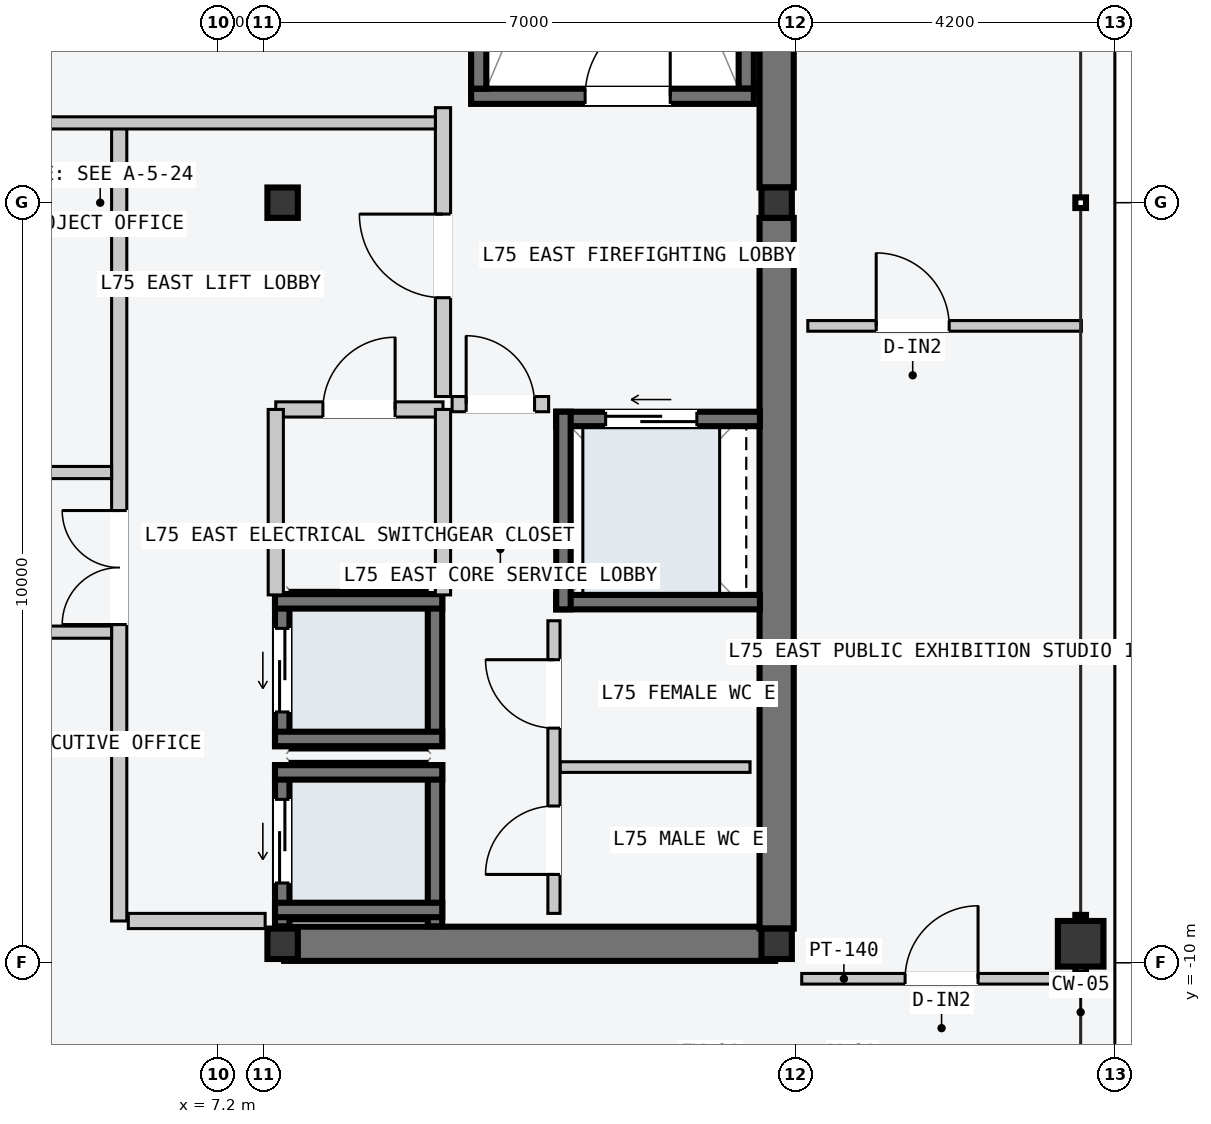
"""IFC4 building model, lengths in metres.
Left out: names, types, materials, properties, quantities, classifications, styles, units other than length and angle.
Written with IfcOpenShell. Run it as: python <this file> out.ifc"""

import sys

from ifc_helpers import new_model, si_unit, direction, frame, frame_2d, origin, origin_2d, place, context, subcontext, project, spatial, rectangle, hollow_rectangle, i_section, extrude, element, fill, save


model = new_model("IFC4")
c1 = context("Model", 3, precision=1e-05, world=origin(), true_north=direction((0.0, 1.0)))
c2 = subcontext(c1, "Body", "Model", "MODEL_VIEW")
j1 = project(units=[si_unit("LENGTHUNIT", "METRE"), si_unit("PLANEANGLEUNIT", "RADIAN")], contexts=[c1])
p1 = place(None, origin())
s1 = spatial("IfcSite", under=j1, at=p1, CompositionType="ELEMENT")
p2 = place(p1, origin())
s2 = spatial("IfcBuilding", under=s1, at=p2, CompositionType="ELEMENT")
p3 = place(p2, frame((0.0, 0.0, 284.4)))
s3 = spatial("IfcBuildingStorey", under=s2, at=p3, CompositionType="ELEMENT", Elevation=284.4)
p4 = place(p3, frame((8.07, -9.75, -0.2), z_axis=(0.0, 0.0, 1.0), x_axis=(1.0, 0.0, 0.0)))
e1 = element("IfcWall", 1, at=p4, inside=s3, PredefinedType="SHEAR", context=c2, shape_type="SweptSolid", body=[
    extrude(rectangle(XDim=6.46, YDim=0.45, at=frame_2d((3.23, 0.0))), origin(), (0.0, 0.0, 1.0), 4.8),
])
for number, where, z_axis, x_axis in (
    (2, (14.55, -9.55, -0.2), (0.0, 0.0, 1.0), (0.0, 1.0, 0.0)),
    (3, (14.55, 0.2, -0.2), (0.0, 0.0, 1.0), (0.0, 1.0, 0.0)),
):
    element("IfcWall", number, at=place(p3, frame(where, z_axis=z_axis, x_axis=x_axis)), inside=s3, PredefinedType="SHEAR", context=c2, shape_type="SweptSolid", body=[
        extrude(rectangle(XDim=9.35, YDim=0.45, at=frame_2d((4.675, 0.0))), origin(), (0.0, 0.0, 1.0), 4.8),
    ])
p5 = place(p3, frame((14.15, 1.5, -0.2), z_axis=(0.0, 0.0, 1.0), x_axis=(0.0, 1.0, 0.0)))
e4 = element("IfcWall", 4, at=p5, inside=s3, PredefinedType="SOLIDWALL", context=c2, shape_type="SweptSolid", body=[
    extrude(rectangle(XDim=7.8, YDim=0.2, at=frame_2d((3.9, 0.0))), origin(), (0.0, 0.0, 1.0), 4.8),
])
p6 = place(p3, frame((10.53, 1.4, -0.2), z_axis=(0.0, 0.0, 1.0), x_axis=(1.0, 0.0, 0.0)))
e5 = element("IfcWall", 5, at=p6, inside=s3, PredefinedType="SOLIDWALL", context=c2, shape_type="SweptSolid", body=[
    extrude(rectangle(XDim=3.72, YDim=0.2, at=frame_2d((1.86, 0.0))), origin(), (0.0, 0.0, 1.0), 4.8),
])
p7 = place(p6, frame((1.5, 0.0, 0.2)))
e6 = element("IfcOpeningElement", 6, at=p7, cuts=e5, PredefinedType="OPENING", context=c2, shape_type="SweptSolid", body=[
    extrude(rectangle(XDim=1.12, YDim=2.18, at=frame_2d((0.56, 1.09))), frame((0.0, 0.11, 0.0), z_axis=(0.0, -1.0, 0.0), x_axis=(1.0, 0.0, 0.0)), (0.0, 0.0, 1.0), 0.22),
])
p8 = place(p3, frame((10.63, 1.5, -0.2), z_axis=(0.0, 0.0, 1.0), x_axis=(0.0, 1.0, 0.0)))
e7 = element("IfcWall", 7, at=p8, inside=s3, PredefinedType="SOLIDWALL", context=c2, shape_type="SweptSolid", body=[
    extrude(rectangle(XDim=7.8, YDim=0.2, at=frame_2d((3.9, 0.0))), origin(), (0.0, 0.0, 1.0), 4.8),
])
for number, where, z_axis, x_axis in (
    (8, (8.05, -9.75, 0.0), (0.0, 0.0, 1.0), (1.0, 0.0, 0.0)),
    (9, (8.05, 0.0, 0.0), (0.0, 0.0, 1.0), (1.0, 0.0, 0.0)),
    (10, (14.55, -9.75, 0.0), (0.0, 0.0, 1.0), (1.0, 0.0, 0.0)),
    (11, (14.55, 0.0, 0.0), (0.0, 0.0, 1.0), (1.0, 0.0, 0.0)),
):
    element("IfcColumn", number, at=place(p3, frame(where, z_axis=z_axis, x_axis=x_axis)), inside=s3, PredefinedType="COLUMN", context=c2, shape_type="SweptSolid", body=[
        extrude(i_section(OverallWidth=0.4, OverallDepth=0.4, WebThickness=0.013, FlangeThickness=0.021, at=origin_2d()), origin(), (0.0, 0.0, 1.0), 4.8),
    ])
p9 = place(p3, frame((18.55, -9.75, 0.0), z_axis=(0.0, 0.0, 1.0), x_axis=(0.0, 1.0, 0.0)))
e12 = element("IfcColumn", 12, at=p9, inside=s3, PredefinedType="COLUMN", context=c2, shape_type="SweptSolid", body=[
    extrude(hollow_rectangle(XDim=0.6, YDim=0.6, WallThickness=0.025, at=origin_2d()), origin(), (0.0, 0.0, 1.0), 4.8),
])
p10 = place(p3, frame((8.045, -9.52, -0.2), z_axis=(0.0, 0.0, 1.0), x_axis=(0.0, 1.0, 0.0)))
e13 = element("IfcWall", 13, at=p10, inside=s3, PredefinedType="SOLIDWALL", context=c2, shape_type="SweptSolid", body=[
    extrude(rectangle(XDim=2.12, YDim=0.19, at=frame_2d((1.06, 0.0))), origin(), (0.0, 0.0, 1.0), 4.8),
])
p11 = place(p10, frame((0.57, 0.0, 0.2)))
e14 = element("IfcOpeningElement", 14, at=p11, cuts=e13, PredefinedType="OPENING", context=c2, shape_type="SweptSolid", body=[
    extrude(rectangle(XDim=1.1, YDim=2.2, at=frame_2d((0.55, 1.1))), frame((0.0, 0.105, 0.0), z_axis=(0.0, -1.0, 0.0), x_axis=(1.0, 0.0, 0.0)), (0.0, 0.0, 1.0), 0.21),
])
p12 = place(p3, frame((10.055, -9.52, -0.2), z_axis=(0.0, 0.0, 1.0), x_axis=(0.0, 1.0, 0.0)))
e15 = element("IfcWall", 15, at=p12, inside=s3, PredefinedType="SOLIDWALL", context=c2, shape_type="SweptSolid", body=[
    extrude(rectangle(XDim=2.12, YDim=0.19, at=frame_2d((1.06, 0.0))), origin(), (0.0, 0.0, 1.0), 4.8),
])
for number, where, z_axis, x_axis in (
    (16, (7.95, -7.495, -0.2), (0.0, 0.0, 1.0), (1.0, 0.0, 0.0)),
    (17, (7.95, -9.305, -0.2), (0.0, 0.0, 1.0), (1.0, 0.0, 0.0)),
):
    element("IfcWall", number, at=place(p3, frame(where, z_axis=z_axis, x_axis=x_axis)), inside=s3, PredefinedType="SOLIDWALL", context=c2, shape_type="SweptSolid", body=[
        extrude(rectangle(XDim=2.2, YDim=0.19, at=frame_2d((1.1, 0.0))), origin(), (0.0, 0.0, 1.0), 4.8),
    ])
p13 = place(p3, frame((8.045, -7.15, -0.2), z_axis=(0.0, 0.0, 1.0), x_axis=(0.0, 1.0, 0.0)))
e18 = element("IfcWall", 18, at=p13, inside=s3, PredefinedType="SOLIDWALL", context=c2, shape_type="SweptSolid", body=[
    extrude(rectangle(XDim=2.0, YDim=0.19, at=frame_2d((1.0, 0.0))), origin(), (0.0, 0.0, 1.0), 4.8),
])
p14 = place(p13, frame((0.45, 0.0, 0.2)))
e19 = element("IfcOpeningElement", 19, at=p14, cuts=e18, PredefinedType="OPENING", context=c2, shape_type="SweptSolid", body=[
    extrude(rectangle(XDim=1.1, YDim=2.2, at=frame_2d((0.55, 1.1))), frame((0.0, 0.105, 0.0), z_axis=(0.0, -1.0, 0.0), x_axis=(1.0, 0.0, 0.0)), (0.0, 0.0, 1.0), 0.21),
])
p15 = place(p3, frame((10.055, -7.15, -0.2), z_axis=(0.0, 0.0, 1.0), x_axis=(0.0, 1.0, 0.0)))
e20 = element("IfcWall", 20, at=p15, inside=s3, PredefinedType="SOLIDWALL", context=c2, shape_type="SweptSolid", body=[
    extrude(rectangle(XDim=2.0, YDim=0.19, at=frame_2d((1.0, 0.0))), origin(), (0.0, 0.0, 1.0), 4.8),
])
for number, where, z_axis, x_axis in (
    (21, (7.95, -5.245, -0.2), (0.0, 0.0, 1.0), (1.0, 0.0, 0.0)),
    (22, (7.95, -7.055, -0.2), (0.0, 0.0, 1.0), (1.0, 0.0, 0.0)),
):
    element("IfcWall", number, at=place(p3, frame(where, z_axis=z_axis, x_axis=x_axis)), inside=s3, PredefinedType="SOLIDWALL", context=c2, shape_type="SweptSolid", body=[
        extrude(rectangle(XDim=2.2, YDim=0.19, at=frame_2d((1.1, 0.0))), origin(), (0.0, 0.0, 1.0), 4.8),
    ])
p16 = place(p3, frame((11.65, -2.845, -0.2), z_axis=(0.0, 0.0, 1.0), x_axis=(1.0, 0.0, 0.0)))
e23 = element("IfcWall", 23, at=p16, inside=s3, PredefinedType="SOLIDWALL", context=c2, shape_type="SweptSolid", body=[
    extrude(rectangle(XDim=2.68, YDim=0.19, at=frame_2d((1.34, 0.0))), origin(), (0.0, 0.0, 1.0), 4.8),
])
p17 = place(p16, frame((0.65, 0.0, 0.2)))
e24 = element("IfcOpeningElement", 24, at=p17, cuts=e23, PredefinedType="OPENING", context=c2, shape_type="SweptSolid", body=[
    extrude(rectangle(XDim=1.2, YDim=2.2, at=frame_2d((0.6, 1.1))), frame((0.0, 0.105, 0.0), z_axis=(0.0, -1.0, 0.0), x_axis=(1.0, 0.0, 0.0)), (0.0, 0.0, 1.0), 0.21),
])
p18 = place(p3, frame((11.65, -5.255, -0.2), z_axis=(0.0, 0.0, 1.0), x_axis=(1.0, 0.0, 0.0)))
e25 = element("IfcWall", 25, at=p18, inside=s3, PredefinedType="SOLIDWALL", context=c2, shape_type="SweptSolid", body=[
    extrude(rectangle(XDim=2.68, YDim=0.19, at=frame_2d((1.34, 0.0))), origin(), (0.0, 0.0, 1.0), 4.8),
])
p19 = place(p3, frame((11.745, -5.35, -0.2), z_axis=(0.0, 0.0, 1.0), x_axis=(0.0, 1.0, 0.0)))
e26 = element("IfcWall", 26, at=p19, inside=s3, PredefinedType="SOLIDWALL", context=c2, shape_type="SweptSolid", body=[
    extrude(rectangle(XDim=2.6, YDim=0.19, at=frame_2d((1.3, 0.0))), origin(), (0.0, 0.0, 1.0), 4.8),
])
p20 = place(p3, frame((5.9, -9.45, 0.0), z_axis=(0.0, 0.0, 1.0), x_axis=(0.0, 1.0, 0.0)))
e27 = element("IfcWall", 27, at=p20, inside=s3, PredefinedType="PARTITIONING", context=c2, shape_type="SweptSolid", body=[
    extrude(rectangle(XDim=10.5, YDim=0.2, at=frame_2d((5.25, 0.0))), origin(), (0.0, 0.0, 1.0), 4.6),
])
p21 = place(p20, frame((3.9, 0.0, 0.0)))
e28 = element("IfcOpeningElement", 28, at=p21, cuts=e27, PredefinedType="OPENING", context=c2, shape_type="SweptSolid", body=[
    extrude(rectangle(XDim=1.5, YDim=2.2, at=frame_2d((0.75, 1.1))), frame((0.0, 0.11, 0.0), z_axis=(0.0, -1.0, 0.0), x_axis=(1.0, 0.0, 0.0)), (0.0, 0.0, 1.0), 0.22),
])
p22 = place(p3, frame((6.02, -9.45, 0.0), z_axis=(0.0, 0.0, 1.0), x_axis=(1.0, 0.0, 0.0)))
e29 = element("IfcWall", 29, at=p22, inside=s3, PredefinedType="PARTITIONING", context=c2, shape_type="SweptSolid", body=[
    extrude(rectangle(XDim=1.8, YDim=0.2, at=frame_2d((0.9, 0.0))), origin(), (0.0, 0.0, 1.0), 4.6),
])
p23 = place(p3, frame((10.16, -2.55, 0.0), z_axis=(0.0, 0.0, 1.0), x_axis=(0.0, 1.0, 0.0)))
e30 = element("IfcWall", 30, at=p23, inside=s3, PredefinedType="PARTITIONING", context=c2, shape_type="SweptSolid", body=[
    extrude(rectangle(XDim=3.8, YDim=0.2, at=frame_2d((1.9, 0.0))), origin(), (0.0, 0.0, 1.0), 4.6),
])
p24 = place(p23, frame((1.3, 0.0, 0.0)))
e31 = element("IfcOpeningElement", 31, at=p24, cuts=e30, PredefinedType="OPENING", context=c2, shape_type="SweptSolid", body=[
    extrude(rectangle(XDim=1.1, YDim=2.15, at=frame_2d((0.55, 1.075))), frame((0.0, 0.11, 0.0), z_axis=(0.0, -1.0, 0.0), x_axis=(1.0, 0.0, 0.0)), (0.0, 0.0, 1.0), 0.22),
])
p25 = place(p3, frame((10.28, -2.65, 0.0), z_axis=(0.0, 0.0, 1.0), x_axis=(1.0, 0.0, 0.0)))
e32 = element("IfcWall", 32, at=p25, inside=s3, PredefinedType="PARTITIONING", context=c2, shape_type="SweptSolid", body=[
    extrude(rectangle(XDim=1.27, YDim=0.2, at=frame_2d((0.635, 0.0))), origin(), (0.0, 0.0, 1.0), 4.6),
])
p26 = place(p25, frame((0.185, 0.0, 0.0)))
e33 = element("IfcOpeningElement", 33, at=p26, cuts=e32, PredefinedType="OPENING", context=c2, shape_type="SweptSolid", body=[
    extrude(rectangle(XDim=0.9, YDim=2.15, at=frame_2d((0.45, 1.075))), frame((0.0, 0.11, 0.0), z_axis=(0.0, -1.0, 0.0), x_axis=(1.0, 0.0, 0.0)), (0.0, 0.0, 1.0), 0.22),
])
p27 = place(p3, frame((7.96, -2.72, 0.0), z_axis=(0.0, 0.0, 1.0), x_axis=(1.0, 0.0, 0.0)))
e34 = element("IfcWall", 34, at=p27, inside=s3, PredefinedType="PARTITIONING", context=c2, shape_type="SweptSolid", body=[
    extrude(rectangle(XDim=2.2, YDim=0.2, at=frame_2d((1.1, 0.0))), origin(), (0.0, 0.0, 1.0), 4.6),
])
p28 = place(p27, frame((0.62, 0.0, 0.0)))
e35 = element("IfcOpeningElement", 35, at=p28, cuts=e34, PredefinedType="OPENING", context=c2, shape_type="SweptSolid", body=[
    extrude(rectangle(XDim=0.95, YDim=2.1, at=frame_2d((0.475, 1.05))), frame((0.0, 0.11, 0.0), z_axis=(0.0, -1.0, 0.0), x_axis=(1.0, 0.0, 0.0)), (0.0, 0.0, 1.0), 0.22),
])
for number, where, z_axis, x_axis in (
    (36, (7.96, -5.16, 0.0), (0.0, 0.0, 1.0), (0.0, 1.0, 0.0)),
    (37, (10.16, -5.16, 0.0), (0.0, 0.0, 1.0), (0.0, 1.0, 0.0)),
):
    element("IfcWall", number, at=place(p3, frame(where, z_axis=z_axis, x_axis=x_axis)), inside=s3, PredefinedType="PARTITIONING", context=c2, shape_type="SweptSolid", body=[
        extrude(rectangle(XDim=2.44, YDim=0.2, at=frame_2d((1.22, 0.0))), origin(), (0.0, 0.0, 1.0), 4.6),
    ])
p29 = place(p3, frame((11.7, -7.425, 0.0), z_axis=(0.0, 0.0, 1.0), x_axis=(1.0, 0.0, 0.0)))
e38 = element("IfcWall", 38, at=p29, inside=s3, PredefinedType="PARTITIONING", context=c2, shape_type="SweptSolid", body=[
    extrude(rectangle(XDim=2.5, YDim=0.14, at=frame_2d((1.25, 0.0))), origin(), (0.0, 0.0, 1.0), 4.6),
])
p30 = place(p3, frame((11.62, -9.35, 0.0), z_axis=(0.0, 0.0, 1.0), x_axis=(0.0, 1.0, 0.0)))
e39 = element("IfcWall", 39, at=p30, inside=s3, PredefinedType="PARTITIONING", context=c2, shape_type="SweptSolid", body=[
    extrude(rectangle(XDim=3.85, YDim=0.16, at=frame_2d((1.925, 0.0))), origin(), (0.0, 0.0, 1.0), 4.6),
])
p31 = place(p30, frame((0.512, 0.0, 0.0)))
e40 = element("IfcOpeningElement", 40, at=p31, cuts=e39, PredefinedType="OPENING", context=c2, shape_type="SweptSolid", body=[
    extrude(rectangle(XDim=0.9, YDim=2.15, at=frame_2d((0.45, 1.075))), frame((0.0, 0.09, 0.0), z_axis=(0.0, -1.0, 0.0), x_axis=(1.0, 0.0, 0.0)), (0.0, 0.0, 1.0), 0.18),
])
p32 = place(p30, frame((2.438, 0.0, 0.0)))
e41 = element("IfcOpeningElement", 41, at=p32, cuts=e39, PredefinedType="OPENING", context=c2, shape_type="SweptSolid", body=[
    extrude(rectangle(XDim=0.9, YDim=2.15, at=frame_2d((0.45, 1.075))), frame((0.0, 0.09, 0.0), z_axis=(0.0, -1.0, 0.0), x_axis=(1.0, 0.0, 0.0)), (0.0, 0.0, 1.0), 0.18),
])
p33 = place(p3, frame((3.01, 1.05, 0.0), z_axis=(0.0, 0.0, 1.0), x_axis=(1.0, 0.0, 0.0)))
e42 = element("IfcWall", 42, at=p33, inside=s3, PredefinedType="PARTITIONING", context=c2, shape_type="SweptSolid", body=[
    extrude(rectangle(XDim=7.05, YDim=0.16, at=frame_2d((3.525, 0.0))), origin(), (0.0, 0.0, 1.0), 4.6),
])
for number, where, z_axis, x_axis in (
    (43, (3.01, -3.55, 0.0), (0.0, 0.0, 1.0), (1.0, 0.0, 0.0)),
    (44, (3.01, -5.65, 0.0), (0.0, 0.0, 1.0), (1.0, 0.0, 0.0)),
):
    element("IfcWall", number, at=place(p3, frame(where, z_axis=z_axis, x_axis=x_axis)), inside=s3, PredefinedType="PARTITIONING", context=c2, shape_type="SweptSolid", body=[
        extrude(rectangle(XDim=2.79, YDim=0.16, at=frame_2d((1.395, 0.0))), origin(), (0.0, 0.0, 1.0), 4.6),
    ])
p34 = place(p3, frame((14.88, -10.21, 0.0), z_axis=(0.0, 0.0, 1.0), x_axis=(1.0, 0.0, 0.0)))
e45 = element("IfcWall", 45, at=p34, inside=s3, PredefinedType="PARTITIONING", context=c2, shape_type="SweptSolid", body=[
    extrude(rectangle(XDim=3.68, YDim=0.14, at=frame_2d((1.84, 0.0))), origin(), (0.0, 0.0, 1.0), 4.6),
])
p35 = place(p34, frame((1.36, 0.0, 0.0)))
e46 = element("IfcOpeningElement", 46, at=p35, cuts=e45, PredefinedType="OPENING", context=c2, shape_type="SweptSolid", body=[
    extrude(rectangle(XDim=0.96, YDim=2.18, at=frame_2d((0.48, 1.09))), frame((0.0, 0.08, 0.0), z_axis=(0.0, -1.0, 0.0), x_axis=(1.0, 0.0, 0.0)), (0.0, 0.0, 1.0), 0.16),
])
p36 = place(p3, frame((14.96, -1.621, 0.0), z_axis=(0.0, 0.0, 1.0), x_axis=(1.0, 0.0, 0.0)))
e47 = element("IfcWall", 47, at=p36, inside=s3, PredefinedType="PARTITIONING", context=c2, shape_type="SweptSolid", body=[
    extrude(rectangle(XDim=3.6, YDim=0.14, at=frame_2d((1.8, 0.0))), origin(), (0.0, 0.0, 1.0), 4.6),
])
p37 = place(p36, frame((0.9, 0.0, 0.0)))
e48 = element("IfcOpeningElement", 48, at=p37, cuts=e47, PredefinedType="OPENING", context=c2, shape_type="SweptSolid", body=[
    extrude(rectangle(XDim=0.96, YDim=2.18, at=frame_2d((0.48, 1.09))), frame((0.0, 0.08, 0.0), z_axis=(0.0, -1.0, 0.0), x_axis=(1.0, 0.0, 0.0)), (0.0, 0.0, 1.0), 0.16),
])
p38 = place(p7, origin())
e49 = element("IfcDoor", 49, at=p38, inside=s3, OperationType="SINGLE_SWING_RIGHT", PredefinedType="DOOR", context=c2, shape_type="SweptSolid", body=[
    extrude(rectangle(XDim=1.12, YDim=2.18, at=frame_2d((0.56, 1.09))), frame((0.0, 0.025, 0.0), z_axis=(0.0, -1.0, 0.0), x_axis=(1.0, 0.0, 0.0)), (0.0, 0.0, 1.0), 0.05),
])
fill(e6, e49)
p39 = place(p11, origin())
e50 = element("IfcDoor", 50, at=p39, inside=s3, OperationType="SLIDING_TO_LEFT", PredefinedType="DOOR", context=c2, shape_type="SweptSolid", body=[
    extrude(rectangle(XDim=1.1, YDim=2.2, at=frame_2d((0.55, 1.1))), frame((0.0, 0.025, 0.0), z_axis=(0.0, -1.0, 0.0), x_axis=(1.0, 0.0, 0.0)), (0.0, 0.0, 1.0), 0.05),
])
fill(e14, e50)
p40 = place(p14, origin())
e51 = element("IfcDoor", 51, at=p40, inside=s3, OperationType="SLIDING_TO_LEFT", PredefinedType="DOOR", context=c2, shape_type="SweptSolid", body=[
    extrude(rectangle(XDim=1.1, YDim=2.2, at=frame_2d((0.55, 1.1))), frame((0.0, 0.025, 0.0), z_axis=(0.0, -1.0, 0.0), x_axis=(1.0, 0.0, 0.0)), (0.0, 0.0, 1.0), 0.05),
])
fill(e19, e51)
p41 = place(p17, origin())
e52 = element("IfcDoor", 52, at=p41, inside=s3, OperationType="SLIDING_TO_LEFT", PredefinedType="DOOR", context=c2, shape_type="SweptSolid", body=[
    extrude(rectangle(XDim=1.2, YDim=2.2, at=frame_2d((0.6, 1.1))), frame((0.0, 0.025, 0.0), z_axis=(0.0, -1.0, 0.0), x_axis=(1.0, 0.0, 0.0)), (0.0, 0.0, 1.0), 0.05),
])
fill(e24, e52)
p42 = place(p21, origin())
e53 = element("IfcDoor", 53, at=p42, inside=s3, OperationType="DOUBLE_DOOR_SINGLE_SWING", PredefinedType="DOOR", context=c2, shape_type="SweptSolid", body=[
    extrude(rectangle(XDim=1.5, YDim=2.2, at=frame_2d((0.75, 1.1))), frame((0.0, 0.025, 0.0), z_axis=(0.0, -1.0, 0.0), x_axis=(1.0, 0.0, 0.0)), (0.0, 0.0, 1.0), 0.05),
])
fill(e28, e53)
p43 = place(p24, origin())
e54 = element("IfcDoor", 54, at=p43, inside=s3, OperationType="SINGLE_SWING_RIGHT", PredefinedType="DOOR", context=c2, shape_type="SweptSolid", body=[
    extrude(rectangle(XDim=1.1, YDim=2.15, at=frame_2d((0.55, 1.075))), frame((0.0, 0.025, 0.0), z_axis=(0.0, -1.0, 0.0), x_axis=(1.0, 0.0, 0.0)), (0.0, 0.0, 1.0), 0.05),
])
fill(e31, e54)
p44 = place(p26, origin())
e55 = element("IfcDoor", 55, at=p44, inside=s3, OperationType="SINGLE_SWING_LEFT", PredefinedType="DOOR", context=c2, shape_type="SweptSolid", body=[
    extrude(rectangle(XDim=0.9, YDim=2.15, at=frame_2d((0.45, 1.075))), frame((0.0, 0.025, 0.0), z_axis=(0.0, -1.0, 0.0), x_axis=(1.0, 0.0, 0.0)), (0.0, 0.0, 1.0), 0.05),
])
fill(e33, e55)
p45 = place(p28, origin())
e56 = element("IfcDoor", 56, at=p45, inside=s3, OperationType="SINGLE_SWING_RIGHT", PredefinedType="DOOR", context=c2, shape_type="SweptSolid", body=[
    extrude(rectangle(XDim=0.95, YDim=2.1, at=frame_2d((0.475, 1.05))), frame((0.0, 0.025, 0.0), z_axis=(0.0, -1.0, 0.0), x_axis=(1.0, 0.0, 0.0)), (0.0, 0.0, 1.0), 0.05),
])
fill(e35, e56)
p46 = place(p31, origin())
e57 = element("IfcDoor", 57, at=p46, inside=s3, OperationType="SINGLE_SWING_LEFT", PredefinedType="DOOR", context=c2, shape_type="SweptSolid", body=[
    extrude(rectangle(XDim=0.9, YDim=2.15, at=frame_2d((0.45, 1.075))), frame((0.0, 0.025, 0.0), z_axis=(0.0, -1.0, 0.0), x_axis=(1.0, 0.0, 0.0)), (0.0, 0.0, 1.0), 0.05),
])
fill(e40, e57)
p47 = place(p32, origin())
e58 = element("IfcDoor", 58, at=p47, inside=s3, OperationType="SINGLE_SWING_RIGHT", PredefinedType="DOOR", context=c2, shape_type="SweptSolid", body=[
    extrude(rectangle(XDim=0.9, YDim=2.15, at=frame_2d((0.45, 1.075))), frame((0.0, 0.025, 0.0), z_axis=(0.0, -1.0, 0.0), x_axis=(1.0, 0.0, 0.0)), (0.0, 0.0, 1.0), 0.05),
])
fill(e41, e58)
p48 = place(p35, origin())
e59 = element("IfcDoor", 59, at=p48, inside=s3, OperationType="SINGLE_SWING_RIGHT", PredefinedType="DOOR", context=c2, shape_type="SweptSolid", body=[
    extrude(rectangle(XDim=0.96, YDim=2.18, at=frame_2d((0.48, 1.09))), frame((0.0, 0.025, 0.0), z_axis=(0.0, -1.0, 0.0), x_axis=(1.0, 0.0, 0.0)), (0.0, 0.0, 1.0), 0.05),
])
fill(e46, e59)
p49 = place(p37, origin())
e60 = element("IfcDoor", 60, at=p49, inside=s3, OperationType="SINGLE_SWING_LEFT", PredefinedType="DOOR", context=c2, shape_type="SweptSolid", body=[
    extrude(rectangle(XDim=0.96, YDim=2.18, at=frame_2d((0.48, 1.09))), frame((0.0, 0.025, 0.0), z_axis=(0.0, -1.0, 0.0), x_axis=(1.0, 0.0, 0.0)), (0.0, 0.0, 1.0), 0.05),
])
fill(e48, e60)
save(model, sys.argv[1])
